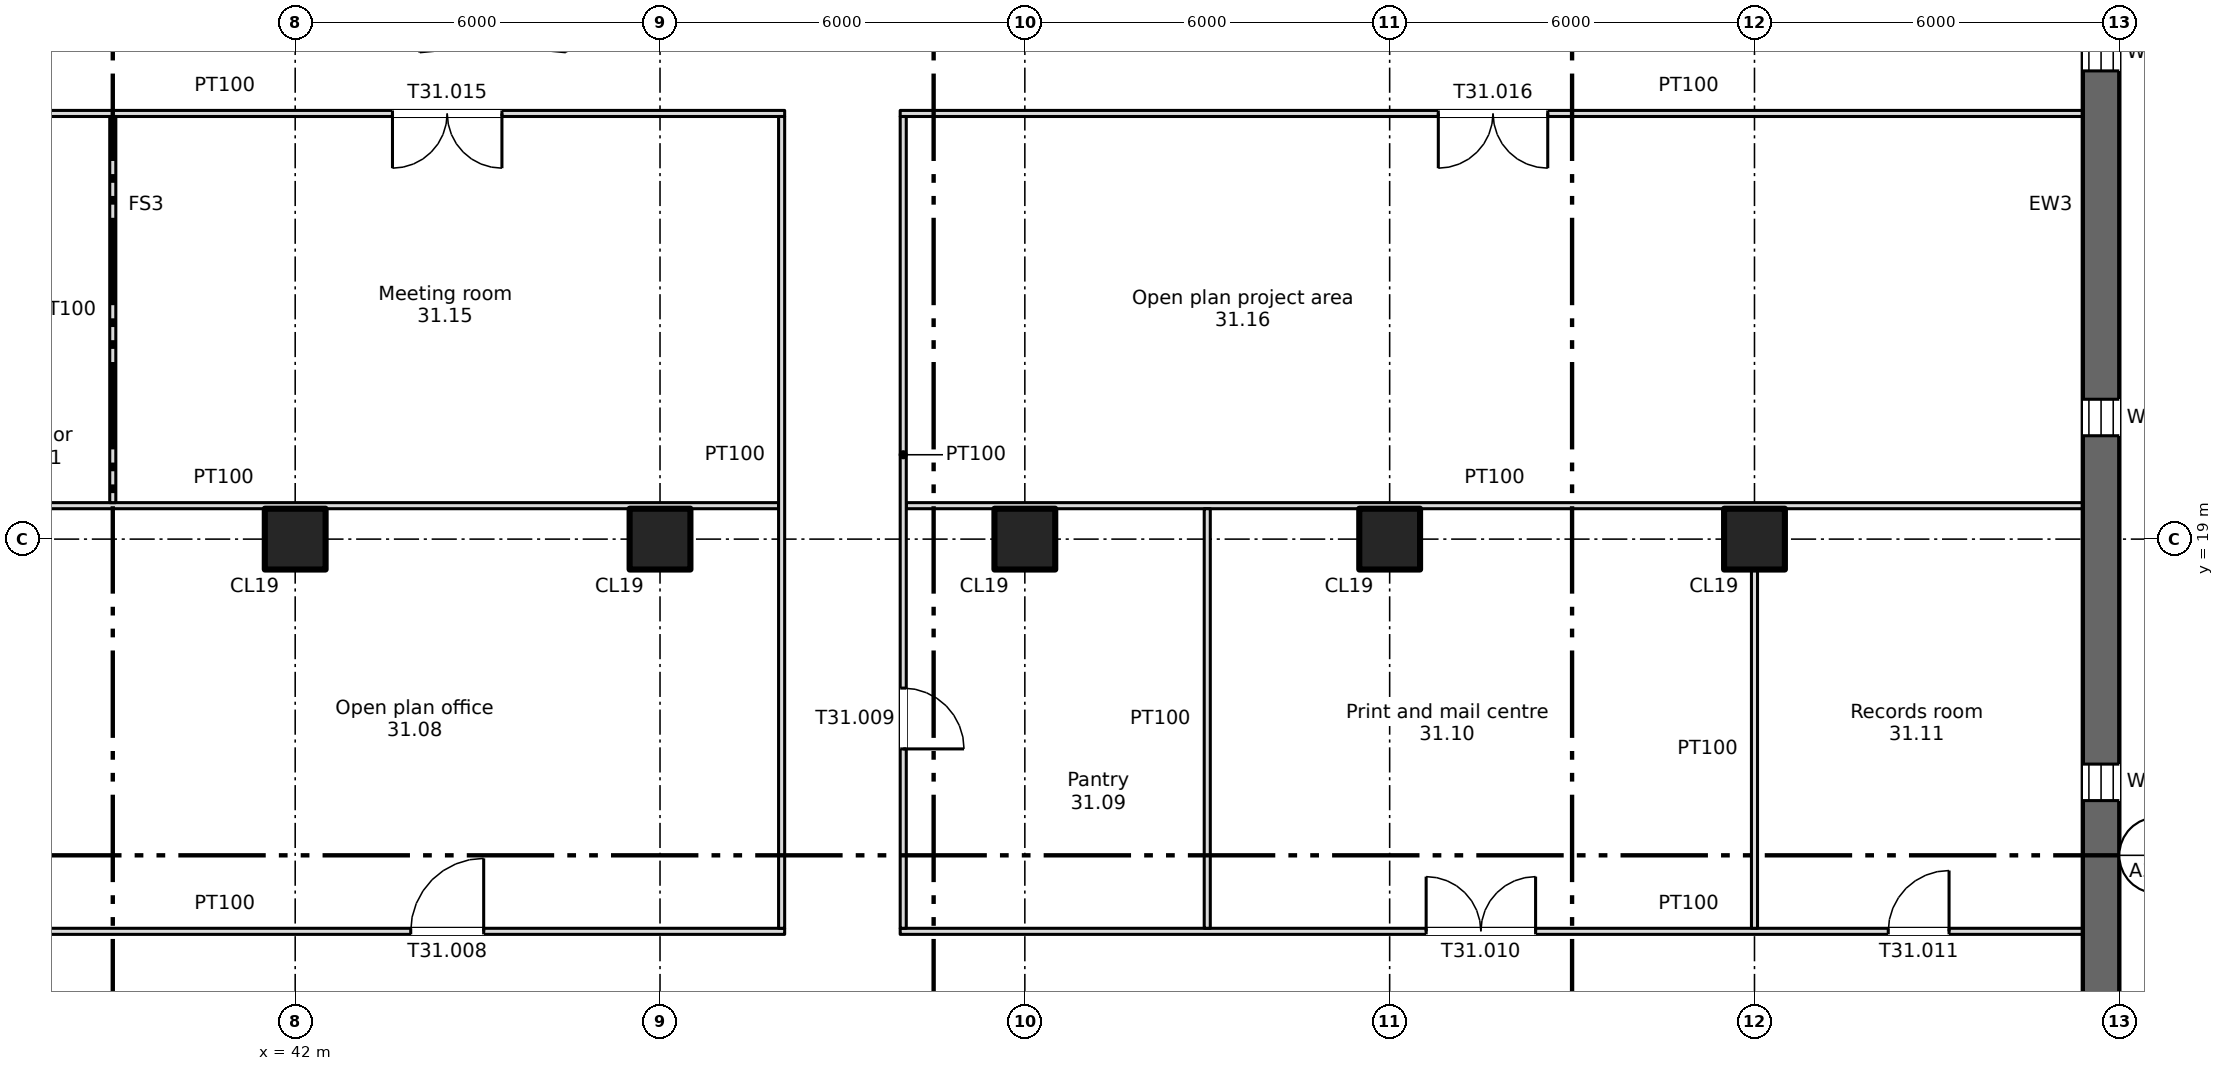
"""IFC4 building model, lengths in metres.
Left out: names, types, materials, properties, quantities, classifications, styles, units other than length and angle.
Written with IfcOpenShell. Run it as: python <this file> out.ifc"""

import sys

from ifc_helpers import new_model, si_unit, direction, frame, frame_2d, origin, origin_2d, place, context, subcontext, project, spatial, rectangle, extrude, element, fill, save


model = new_model("IFC4")
c1 = context("Model", 3, precision=1e-05, world=origin(), true_north=direction((0.0, 1.0)))
c2 = subcontext(c1, "Body", "Model", "MODEL_VIEW")
j1 = project(units=[si_unit("LENGTHUNIT", "METRE"), si_unit("PLANEANGLEUNIT", "RADIAN")], contexts=[c1])
p1 = place(None, origin())
s1 = spatial("IfcSite", under=j1, at=p1, CompositionType="ELEMENT")
p2 = place(p1, origin())
s2 = spatial("IfcBuilding", under=s1, at=p2, CompositionType="ELEMENT")
p3 = place(p2, frame((0.0, 0.0, 215.5)))
s3 = spatial("IfcBuildingStorey", under=s2, at=p3, CompositionType="ELEMENT", Elevation=215.5)
for number, where, z_axis, x_axis in (
    (1, (42.0, 19.0, 0.0), (0.0, 0.0, 1.0), (1.0, 0.0, 0.0)),
    (2, (48.0, 19.0, 0.0), (0.0, 0.0, 1.0), (1.0, 0.0, 0.0)),
    (3, (54.0, 19.0, 0.0), (0.0, 0.0, 1.0), (1.0, 0.0, 0.0)),
    (4, (60.0, 19.0, 0.0), (0.0, 0.0, 1.0), (1.0, 0.0, 0.0)),
    (5, (66.0, 19.0, 0.0), (0.0, 0.0, 1.0), (1.0, 0.0, 0.0)),
):
    element("IfcColumn", number, at=place(p3, frame(where, z_axis=z_axis, x_axis=x_axis)), inside=s3, PredefinedType="COLUMN", context=c2, shape_type="SweptSolid", body=[
        extrude(rectangle(XDim=1.0, YDim=1.0, at=origin_2d()), origin(), (0.0, 0.0, 1.0), 3.35),
    ])
p4 = place(p3, frame((71.7, 7.5, 0.0), z_axis=(0.0, 0.0, 1.0), x_axis=(0.0, 1.0, 0.0)))
e6 = element("IfcWall", 6, at=p4, inside=s3, PredefinedType="SHEAR", context=c2, shape_type="SweptSolid", body=[
    extrude(rectangle(XDim=34.0, YDim=0.6, at=frame_2d((17.0, 0.0))), origin(), (0.0, 0.0, 1.0), 3.35),
])
p5 = place(p4, frame((1.2, 0.0, 0.6)))
e7 = element("IfcOpeningElement", 7, at=p5, cuts=e6, PredefinedType="OPENING", context=c2, shape_type="SweptSolid", body=[
    extrude(rectangle(XDim=0.6, YDim=2.4, at=frame_2d((0.3, 1.2))), frame((0.0, 0.31, 0.0), z_axis=(0.0, -1.0, 0.0), x_axis=(1.0, 0.0, 0.0)), (0.0, 0.0, 1.0), 0.62),
])
p6 = place(p4, frame((7.2, 0.0, 0.6)))
e8 = element("IfcOpeningElement", 8, at=p6, cuts=e6, PredefinedType="OPENING", context=c2, shape_type="SweptSolid", body=[
    extrude(rectangle(XDim=0.6, YDim=2.4, at=frame_2d((0.3, 1.2))), frame((0.0, 0.31, 0.0), z_axis=(0.0, -1.0, 0.0), x_axis=(1.0, 0.0, 0.0)), (0.0, 0.0, 1.0), 0.62),
])
p7 = place(p4, frame((13.2, 0.0, 0.6)))
e9 = element("IfcOpeningElement", 9, at=p7, cuts=e6, PredefinedType="OPENING", context=c2, shape_type="SweptSolid", body=[
    extrude(rectangle(XDim=0.6, YDim=2.4, at=frame_2d((0.3, 1.2))), frame((0.0, 0.31, 0.0), z_axis=(0.0, -1.0, 0.0), x_axis=(1.0, 0.0, 0.0)), (0.0, 0.0, 1.0), 0.62),
])
p8 = place(p4, frame((19.2, 0.0, 0.6)))
e10 = element("IfcOpeningElement", 10, at=p8, cuts=e6, PredefinedType="OPENING", context=c2, shape_type="SweptSolid", body=[
    extrude(rectangle(XDim=0.6, YDim=2.4, at=frame_2d((0.3, 1.2))), frame((0.0, 0.31, 0.0), z_axis=(0.0, -1.0, 0.0), x_axis=(1.0, 0.0, 0.0)), (0.0, 0.0, 1.0), 0.62),
])
p9 = place(p4, frame((25.2, 0.0, 0.6)))
e11 = element("IfcOpeningElement", 11, at=p9, cuts=e6, PredefinedType="OPENING", context=c2, shape_type="SweptSolid", body=[
    extrude(rectangle(XDim=0.6, YDim=2.4, at=frame_2d((0.3, 1.2))), frame((0.0, 0.31, 0.0), z_axis=(0.0, -1.0, 0.0), x_axis=(1.0, 0.0, 0.0)), (0.0, 0.0, 1.0), 0.62),
])
p10 = place(p4, frame((31.2, 0.0, 0.6)))
e12 = element("IfcOpeningElement", 12, at=p10, cuts=e6, PredefinedType="OPENING", context=c2, shape_type="SweptSolid", body=[
    extrude(rectangle(XDim=0.6, YDim=2.4, at=frame_2d((0.3, 1.2))), frame((0.0, 0.31, 0.0), z_axis=(0.0, -1.0, 0.0), x_axis=(1.0, 0.0, 0.0)), (0.0, 0.0, 1.0), 0.62),
])
p11 = place(p3, frame((27.95, 12.55, 0.0), z_axis=(0.0, 0.0, 1.0), x_axis=(1.0, 0.0, 0.0)))
e13 = element("IfcWall", 13, at=p11, inside=s3, PredefinedType="PARTITIONING", context=c2, shape_type="SweptSolid", body=[
    extrude(rectangle(XDim=22.1, YDim=0.1, at=frame_2d((11.05, 0.0))), origin(), (0.0, 0.0, 1.0), 3.35),
])
p12 = place(p11, frame((4.95, 0.0, 0.0)))
e14 = element("IfcOpeningElement", 14, at=p12, cuts=e13, PredefinedType="OPENING", context=c2, shape_type="SweptSolid", body=[
    extrude(rectangle(XDim=1.2, YDim=2.1, at=frame_2d((0.6, 1.05))), frame((0.0, 0.06, 0.0), z_axis=(0.0, -1.0, 0.0), x_axis=(1.0, 0.0, 0.0)), (0.0, 0.0, 1.0), 0.12),
])
p13 = place(p11, frame((15.95, 0.0, 0.0)))
e15 = element("IfcOpeningElement", 15, at=p13, cuts=e13, PredefinedType="OPENING", context=c2, shape_type="SweptSolid", body=[
    extrude(rectangle(XDim=1.2, YDim=2.1, at=frame_2d((0.6, 1.05))), frame((0.0, 0.06, 0.0), z_axis=(0.0, -1.0, 0.0), x_axis=(1.0, 0.0, 0.0)), (0.0, 0.0, 1.0), 0.12),
])
p14 = place(p3, frame((51.95, 12.55, 0.0), z_axis=(0.0, 0.0, 1.0), x_axis=(1.0, 0.0, 0.0)))
e16 = element("IfcWall", 16, at=p14, inside=s3, PredefinedType="PARTITIONING", context=c2, shape_type="SweptSolid", body=[
    extrude(rectangle(XDim=19.45, YDim=0.1, at=frame_2d((9.725, 0.0))), origin(), (0.0, 0.0, 1.0), 3.35),
])
p15 = place(p14, frame((8.65, 0.0, 0.0)))
e17 = element("IfcOpeningElement", 17, at=p15, cuts=e16, PredefinedType="OPENING", context=c2, shape_type="SweptSolid", body=[
    extrude(rectangle(XDim=1.8, YDim=2.1, at=frame_2d((0.9, 1.05))), frame((0.0, 0.06, 0.0), z_axis=(0.0, -1.0, 0.0), x_axis=(1.0, 0.0, 0.0)), (0.0, 0.0, 1.0), 0.12),
])
p16 = place(p14, frame((16.25, 0.0, 0.0)))
e18 = element("IfcOpeningElement", 18, at=p16, cuts=e16, PredefinedType="OPENING", context=c2, shape_type="SweptSolid", body=[
    extrude(rectangle(XDim=1.0, YDim=2.1, at=frame_2d((0.5, 1.05))), frame((0.0, 0.06, 0.0), z_axis=(0.0, -1.0, 0.0), x_axis=(1.0, 0.0, 0.0)), (0.0, 0.0, 1.0), 0.12),
])
p17 = place(p3, frame((28.05, 19.55, 0.0), z_axis=(0.0, 0.0, 1.0), x_axis=(1.0, 0.0, 0.0)))
e19 = element("IfcWall", 19, at=p17, inside=s3, PredefinedType="PARTITIONING", context=c2, shape_type="SweptSolid", body=[
    extrude(rectangle(XDim=21.9, YDim=0.1, at=frame_2d((10.95, 0.0))), origin(), (0.0, 0.0, 1.0), 3.35),
])
p18 = place(p3, frame((52.05, 19.55, 0.0), z_axis=(0.0, 0.0, 1.0), x_axis=(1.0, 0.0, 0.0)))
e20 = element("IfcWall", 20, at=p18, inside=s3, PredefinedType="PARTITIONING", context=c2, shape_type="SweptSolid", body=[
    extrude(rectangle(XDim=19.35, YDim=0.1, at=frame_2d((9.675, 0.0))), origin(), (0.0, 0.0, 1.0), 3.35),
])
p19 = place(p3, frame((27.95, 26.0, 0.0), z_axis=(0.0, 0.0, 1.0), x_axis=(1.0, 0.0, 0.0)))
e21 = element("IfcWall", 21, at=p19, inside=s3, PredefinedType="PARTITIONING", context=c2, shape_type="SweptSolid", body=[
    extrude(rectangle(XDim=22.1, YDim=0.1, at=frame_2d((11.05, 0.0))), origin(), (0.0, 0.0, 1.0), 3.35),
])
p20 = place(p19, frame((4.65, 0.0, 0.0)))
e22 = element("IfcOpeningElement", 22, at=p20, cuts=e21, PredefinedType="OPENING", context=c2, shape_type="SweptSolid", body=[
    extrude(rectangle(XDim=1.8, YDim=2.1, at=frame_2d((0.9, 1.05))), frame((0.0, 0.06, 0.0), z_axis=(0.0, -1.0, 0.0), x_axis=(1.0, 0.0, 0.0)), (0.0, 0.0, 1.0), 0.12),
])
p21 = place(p19, frame((15.65, 0.0, 0.0)))
e23 = element("IfcOpeningElement", 23, at=p21, cuts=e21, PredefinedType="OPENING", context=c2, shape_type="SweptSolid", body=[
    extrude(rectangle(XDim=1.8, YDim=2.1, at=frame_2d((0.9, 1.05))), frame((0.0, 0.06, 0.0), z_axis=(0.0, -1.0, 0.0), x_axis=(1.0, 0.0, 0.0)), (0.0, 0.0, 1.0), 0.12),
])
p22 = place(p3, frame((51.95, 26.0, 0.0), z_axis=(0.0, 0.0, 1.0), x_axis=(1.0, 0.0, 0.0)))
e24 = element("IfcWall", 24, at=p22, inside=s3, PredefinedType="PARTITIONING", context=c2, shape_type="SweptSolid", body=[
    extrude(rectangle(XDim=19.45, YDim=0.1, at=frame_2d((9.725, 0.0))), origin(), (0.0, 0.0, 1.0), 3.35),
])
p23 = place(p22, frame((8.85, 0.0, 0.0)))
e25 = element("IfcOpeningElement", 25, at=p23, cuts=e24, PredefinedType="OPENING", context=c2, shape_type="SweptSolid", body=[
    extrude(rectangle(XDim=1.8, YDim=2.1, at=frame_2d((0.9, 1.05))), frame((0.0, 0.06, 0.0), z_axis=(0.0, -1.0, 0.0), x_axis=(1.0, 0.0, 0.0)), (0.0, 0.0, 1.0), 0.12),
])
p24 = place(p3, frame((39.0, 19.6, 0.0), z_axis=(0.0, 0.0, 1.0), x_axis=(0.0, 1.0, 0.0)))
e26 = element("IfcWall", 26, at=p24, inside=s3, PredefinedType="PARTITIONING", context=c2, shape_type="SweptSolid", body=[
    extrude(rectangle(XDim=6.35, YDim=0.1, at=frame_2d((3.175, 0.0))), origin(), (0.0, 0.0, 1.0), 3.35),
])
p25 = place(p3, frame((50.0, 12.6, 0.0), z_axis=(0.0, 0.0, 1.0), x_axis=(0.0, 1.0, 0.0)))
e27 = element("IfcWall", 27, at=p25, inside=s3, PredefinedType="PARTITIONING", context=c2, shape_type="SweptSolid", body=[
    extrude(rectangle(XDim=13.35, YDim=0.1, at=frame_2d((6.675, 0.0))), origin(), (0.0, 0.0, 1.0), 3.35),
])
p26 = place(p3, frame((52.0, 12.6, 0.0), z_axis=(0.0, 0.0, 1.0), x_axis=(0.0, 1.0, 0.0)))
e28 = element("IfcWall", 28, at=p26, inside=s3, PredefinedType="PARTITIONING", context=c2, shape_type="SweptSolid", body=[
    extrude(rectangle(XDim=13.35, YDim=0.1, at=frame_2d((6.675, 0.0))), origin(), (0.0, 0.0, 1.0), 3.35),
])
p27 = place(p26, frame((2.95, 0.0, 0.0)))
e29 = element("IfcOpeningElement", 29, at=p27, cuts=e28, PredefinedType="OPENING", context=c2, shape_type="SweptSolid", body=[
    extrude(rectangle(XDim=1.0, YDim=2.1, at=frame_2d((0.5, 1.05))), frame((0.0, 0.06, 0.0), z_axis=(0.0, -1.0, 0.0), x_axis=(1.0, 0.0, 0.0)), (0.0, 0.0, 1.0), 0.12),
])
p28 = place(p3, frame((57.0, 12.6, 0.0), z_axis=(0.0, 0.0, 1.0), x_axis=(0.0, 1.0, 0.0)))
e30 = element("IfcWall", 30, at=p28, inside=s3, PredefinedType="PARTITIONING", context=c2, shape_type="SweptSolid", body=[
    extrude(rectangle(XDim=6.9, YDim=0.1, at=frame_2d((3.45, 0.0))), origin(), (0.0, 0.0, 1.0), 3.35),
])
p29 = place(p3, frame((66.0, 12.6, 0.0), z_axis=(0.0, 0.0, 1.0), x_axis=(0.0, 1.0, 0.0)))
e31 = element("IfcWall", 31, at=p29, inside=s3, PredefinedType="PARTITIONING", context=c2, shape_type="SweptSolid", body=[
    extrude(rectangle(XDim=5.9, YDim=0.1, at=frame_2d((2.95, 0.0))), origin(), (0.0, 0.0, 1.0), 3.35),
])
p30 = place(p6, origin())
e32 = element("IfcWindow", 32, at=p30, inside=s3, PartitioningType="SINGLE_PANEL", PredefinedType="WINDOW", context=c2, shape_type="SweptSolid", body=[
    extrude(rectangle(XDim=0.6, YDim=2.4, at=frame_2d((0.3, 1.2))), frame((0.0, 0.03, 0.0), z_axis=(0.0, -1.0, 0.0), x_axis=(1.0, 0.0, 0.0)), (0.0, 0.0, 1.0), 0.06),
])
fill(e8, e32)
p31 = place(p7, origin())
e33 = element("IfcWindow", 33, at=p31, inside=s3, PartitioningType="SINGLE_PANEL", PredefinedType="WINDOW", context=c2, shape_type="SweptSolid", body=[
    extrude(rectangle(XDim=0.6, YDim=2.4, at=frame_2d((0.3, 1.2))), frame((0.0, 0.03, 0.0), z_axis=(0.0, -1.0, 0.0), x_axis=(1.0, 0.0, 0.0)), (0.0, 0.0, 1.0), 0.06),
])
fill(e9, e33)
p32 = place(p8, origin())
e34 = element("IfcWindow", 34, at=p32, inside=s3, PartitioningType="SINGLE_PANEL", PredefinedType="WINDOW", context=c2, shape_type="SweptSolid", body=[
    extrude(rectangle(XDim=0.6, YDim=2.4, at=frame_2d((0.3, 1.2))), frame((0.0, 0.03, 0.0), z_axis=(0.0, -1.0, 0.0), x_axis=(1.0, 0.0, 0.0)), (0.0, 0.0, 1.0), 0.06),
])
fill(e10, e34)
p33 = place(p13, origin())
e35 = element("IfcDoor", 35, at=p33, inside=s3, OperationType="SINGLE_SWING_RIGHT", PredefinedType="DOOR", context=c2, shape_type="SweptSolid", body=[
    extrude(rectangle(XDim=1.2, YDim=2.1, at=frame_2d((0.6, 1.05))), frame((0.0, 0.025, 0.0), z_axis=(0.0, -1.0, 0.0), x_axis=(1.0, 0.0, 0.0)), (0.0, 0.0, 1.0), 0.05),
])
fill(e15, e35)
p34 = place(p27, origin())
e36 = element("IfcDoor", 36, at=p34, inside=s3, OperationType="SINGLE_SWING_LEFT", PredefinedType="DOOR", context=c2, shape_type="SweptSolid", body=[
    extrude(rectangle(XDim=1.0, YDim=2.1, at=frame_2d((0.5, 1.05))), frame((0.0, 0.025, 0.0), z_axis=(0.0, -1.0, 0.0), x_axis=(1.0, 0.0, 0.0)), (0.0, 0.0, 1.0), 0.05),
])
fill(e29, e36)
p35 = place(p15, origin())
e37 = element("IfcDoor", 37, at=p35, inside=s3, OperationType="DOUBLE_DOOR_SINGLE_SWING", PredefinedType="DOOR", context=c2, shape_type="SweptSolid", body=[
    extrude(rectangle(XDim=1.8, YDim=2.1, at=frame_2d((0.9, 1.05))), frame((0.0, 0.025, 0.0), z_axis=(0.0, -1.0, 0.0), x_axis=(1.0, 0.0, 0.0)), (0.0, 0.0, 1.0), 0.05),
])
fill(e17, e37)
p36 = place(p16, origin())
e38 = element("IfcDoor", 38, at=p36, inside=s3, OperationType="SINGLE_SWING_RIGHT", PredefinedType="DOOR", context=c2, shape_type="SweptSolid", body=[
    extrude(rectangle(XDim=1.0, YDim=2.1, at=frame_2d((0.5, 1.05))), frame((0.0, 0.025, 0.0), z_axis=(0.0, -1.0, 0.0), x_axis=(1.0, 0.0, 0.0)), (0.0, 0.0, 1.0), 0.05),
])
fill(e18, e38)
p37 = place(p21, origin())
e39 = element("IfcDoor", 39, at=p37, inside=s3, OperationType="DOUBLE_DOOR_SINGLE_SWING", PredefinedType="DOOR", context=c2, shape_type="SweptSolid", body=[
    extrude(rectangle(XDim=1.8, YDim=2.1, at=frame_2d((0.9, 1.05))), frame((0.0, 0.025, 0.0), z_axis=(0.0, -1.0, 0.0), x_axis=(1.0, 0.0, 0.0)), (0.0, 0.0, 1.0), 0.05),
])
fill(e23, e39)
p38 = place(p23, origin())
e40 = element("IfcDoor", 40, at=p38, inside=s3, OperationType="DOUBLE_DOOR_SINGLE_SWING", PredefinedType="DOOR", context=c2, shape_type="SweptSolid", body=[
    extrude(rectangle(XDim=1.8, YDim=2.1, at=frame_2d((0.9, 1.05))), frame((0.0, 0.025, 0.0), z_axis=(0.0, -1.0, 0.0), x_axis=(1.0, 0.0, 0.0)), (0.0, 0.0, 1.0), 0.05),
])
fill(e25, e40)
save(model, sys.argv[1])
